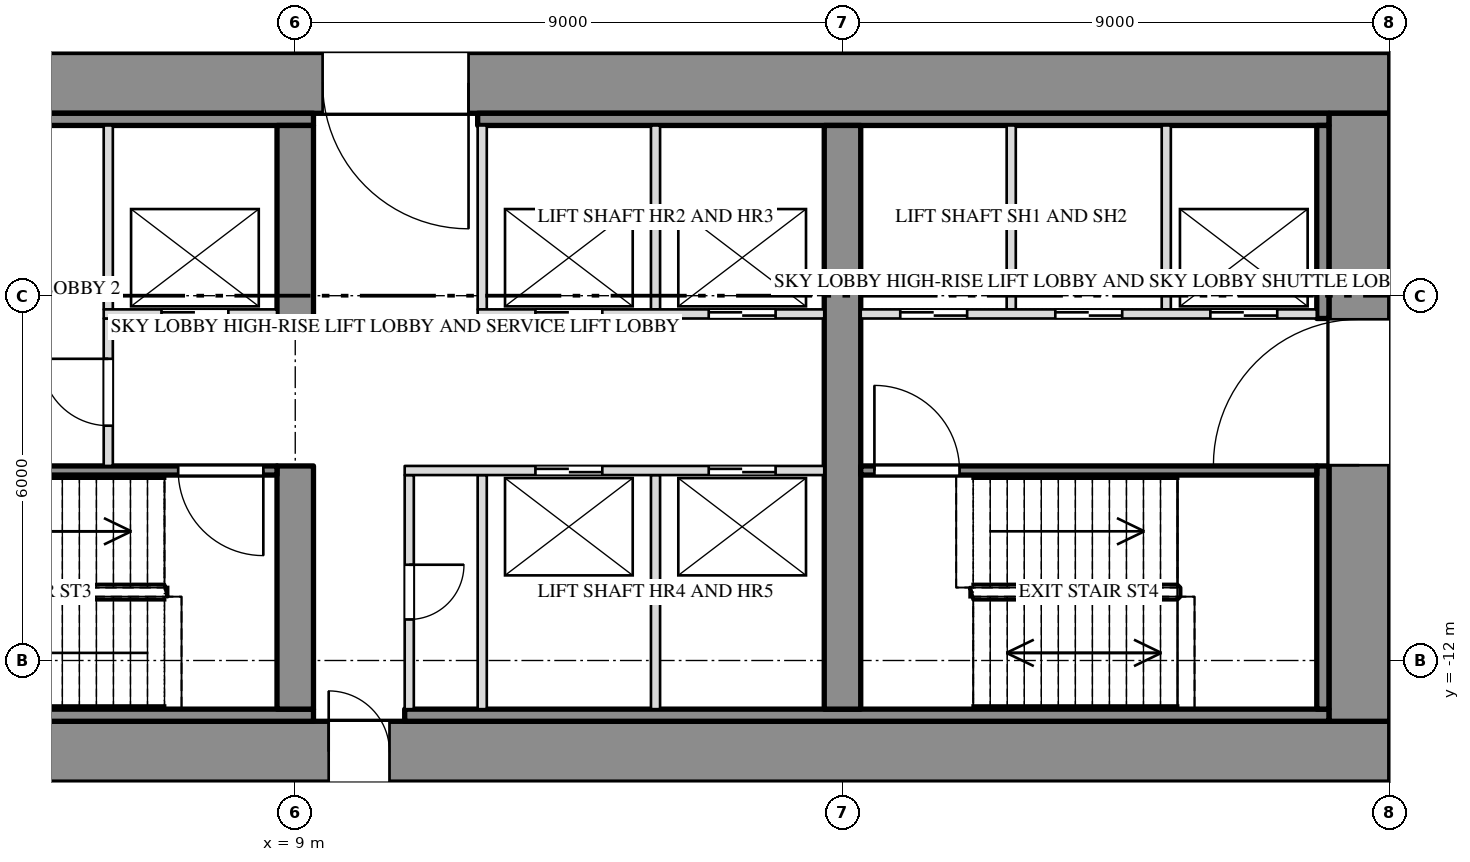
"""IFC4 building model, lengths in metres.
Left out: names, types, materials, properties, quantities, classifications, styles, units other than length and angle.
Written with IfcOpenShell. Run it as: python <this file> out.ifc"""

import sys

from ifc_helpers import new_model, si_unit, direction, frame, frame_2d, origin, place, context, subcontext, project, spatial, rectangle, extrude, element, fill, save


model = new_model("IFC4")
c1 = context("Model", 3, precision=1e-05, world=origin(), true_north=direction((0.0, 1.0)))
c2 = subcontext(c1, "Body", "Model", "MODEL_VIEW")
j1 = project(units=[si_unit("LENGTHUNIT", "METRE"), si_unit("PLANEANGLEUNIT", "RADIAN")], contexts=[c1])
p1 = place(None, origin())
s1 = spatial("IfcSite", under=j1, at=p1, CompositionType="ELEMENT")
p2 = place(p1, origin())
s2 = spatial("IfcBuilding", under=s1, at=p2, CompositionType="ELEMENT")
p3 = place(p2, frame((0.0, 0.0, 156.5)))
s3 = spatial("IfcBuildingStorey", under=s2, at=p3, CompositionType="ELEMENT", Elevation=156.5)
p4 = place(p3, frame((-27.0, -2.5, 0.0), z_axis=(0.0, 0.0, 1.0), x_axis=(1.0, 0.0, 0.0)))
e1 = element("IfcWall", 1, at=p4, inside=s3, PredefinedType="SHEAR", context=c2, shape_type="SweptSolid", body=[
    extrude(rectangle(XDim=54.0, YDim=1.0, at=frame_2d((27.0, 0.0))), origin(), (0.0, 0.0, 1.0), 3.65),
])
p5 = place(p4, frame((15.15, 0.0, 0.0)))
e2 = element("IfcOpeningElement", 2, at=p5, cuts=e1, PredefinedType="OPENING", context=c2, shape_type="SweptSolid", body=[
    extrude(rectangle(XDim=2.4, YDim=2.1, at=frame_2d((1.2, 1.05))), frame((0.0, 0.512, 0.0), z_axis=(0.0, -1.0, 0.0), x_axis=(1.0, 0.0, 0.0)), (0.0, 0.0, 1.0), 1.024),
])
p6 = place(p4, frame((36.45, 0.0, 0.0)))
e3 = element("IfcOpeningElement", 3, at=p6, cuts=e1, PredefinedType="OPENING", context=c2, shape_type="SweptSolid", body=[
    extrude(rectangle(XDim=2.4, YDim=2.1, at=frame_2d((1.2, 1.05))), frame((0.0, 0.512, 0.0), z_axis=(0.0, -1.0, 0.0), x_axis=(1.0, 0.0, 0.0)), (0.0, 0.0, 1.0), 1.024),
])
p7 = place(p3, frame((-27.0, -13.5, 0.0), z_axis=(0.0, 0.0, 1.0), x_axis=(1.0, 0.0, 0.0)))
e4 = element("IfcWall", 4, at=p7, inside=s3, PredefinedType="SHEAR", context=c2, shape_type="SweptSolid", body=[
    extrude(rectangle(XDim=54.0, YDim=1.0, at=frame_2d((27.0, 0.0))), origin(), (0.0, 0.0, 1.0), 3.65),
])
p8 = place(p7, frame((16.45, 0.0, 0.0)))
e5 = element("IfcOpeningElement", 5, at=p8, cuts=e4, PredefinedType="OPENING", context=c2, shape_type="SweptSolid", body=[
    extrude(rectangle(XDim=1.0, YDim=2.1, at=frame_2d((0.5, 1.05))), frame((0.0, 0.512, 0.0), z_axis=(0.0, -1.0, 0.0), x_axis=(1.0, 0.0, 0.0)), (0.0, 0.0, 1.0), 1.024),
])
p9 = place(p7, frame((36.55, 0.0, 0.0)))
e6 = element("IfcOpeningElement", 6, at=p9, cuts=e4, PredefinedType="OPENING", context=c2, shape_type="SweptSolid", body=[
    extrude(rectangle(XDim=1.0, YDim=2.1, at=frame_2d((0.5, 1.05))), frame((0.0, 0.512, 0.0), z_axis=(0.0, -1.0, 0.0), x_axis=(1.0, 0.0, 0.0)), (0.0, 0.0, 1.0), 1.024),
])
p10 = place(p3, frame((26.5, -13.0, 0.0), z_axis=(0.0, 0.0, 1.0), x_axis=(0.0, 1.0, 0.0)))
e7 = element("IfcWall", 7, at=p10, inside=s3, PredefinedType="SHEAR", context=c2, shape_type="SweptSolid", body=[
    extrude(rectangle(XDim=10.0, YDim=1.0, at=frame_2d((5.0, 0.0))), origin(), (0.0, 0.0, 1.0), 3.65),
])
p11 = place(p10, frame((4.212, 0.0, 0.0)))
e8 = element("IfcOpeningElement", 8, at=p11, cuts=e7, PredefinedType="OPENING", context=c2, shape_type="SweptSolid", body=[
    extrude(rectangle(XDim=2.4, YDim=2.1, at=frame_2d((1.2, 1.05))), frame((0.0, 0.512, 0.0), z_axis=(0.0, -1.0, 0.0), x_axis=(1.0, 0.0, 0.0)), (0.0, 0.0, 1.0), 1.024),
])
p12 = place(p3, frame((-9.3, -3.1, 0.0), z_axis=(0.0, 0.0, 1.0), x_axis=(1.0, 0.0, 0.0)))
e9 = element("IfcWall", 9, at=p12, inside=s3, PredefinedType="SHEAR", context=c2, shape_type="SweptSolid", body=[
    extrude(rectangle(XDim=18.6, YDim=0.2, at=frame_2d((9.3, 0.0))), origin(), (0.0, 0.0, 1.0), 3.65),
])
p13 = place(p3, frame((12.0, -3.1, 0.0), z_axis=(0.0, 0.0, 1.0), x_axis=(1.0, 0.0, 0.0)))
e10 = element("IfcWall", 10, at=p13, inside=s3, PredefinedType="SHEAR", context=c2, shape_type="SweptSolid", body=[
    extrude(rectangle(XDim=14.0, YDim=0.2, at=frame_2d((7.0, 0.0))), origin(), (0.0, 0.0, 1.0), 3.65),
])
p14 = place(p3, frame((-9.3, -12.9, 0.0), z_axis=(0.0, 0.0, 1.0), x_axis=(1.0, 0.0, 0.0)))
e11 = element("IfcWall", 11, at=p14, inside=s3, PredefinedType="SHEAR", context=c2, shape_type="SweptSolid", body=[
    extrude(rectangle(XDim=18.6, YDim=0.2, at=frame_2d((9.3, 0.0))), origin(), (0.0, 0.0, 1.0), 3.65),
])
p15 = place(p3, frame((10.8, -12.9, 0.0), z_axis=(0.0, 0.0, 1.0), x_axis=(1.0, 0.0, 0.0)))
e12 = element("IfcWall", 12, at=p15, inside=s3, PredefinedType="SHEAR", context=c2, shape_type="SweptSolid", body=[
    extrude(rectangle(XDim=15.2, YDim=0.2, at=frame_2d((7.6, 0.0))), origin(), (0.0, 0.0, 1.0), 3.65),
])
p16 = place(p3, frame((25.9, -12.8, 0.0), z_axis=(0.0, 0.0, 1.0), x_axis=(0.0, 1.0, 0.0)))
e13 = element("IfcWall", 13, at=p16, inside=s3, PredefinedType="SHEAR", context=c2, shape_type="SweptSolid", body=[
    extrude(rectangle(XDim=4.0, YDim=0.2, at=frame_2d((2.0, 0.0))), origin(), (0.0, 0.0, 1.0), 3.65),
])
p17 = place(p3, frame((25.9, -6.375, 0.0), z_axis=(0.0, 0.0, 1.0), x_axis=(0.0, 1.0, 0.0)))
e14 = element("IfcWall", 14, at=p17, inside=s3, PredefinedType="SHEAR", context=c2, shape_type="SweptSolid", body=[
    extrude(rectangle(XDim=3.175, YDim=0.2, at=frame_2d((1.587, 0.0))), origin(), (0.0, 0.0, 1.0), 3.65),
])
p18 = place(p3, frame((9.0, -12.8, 0.0), z_axis=(0.0, 0.0, 1.0), x_axis=(0.0, 1.0, 0.0)))
e15 = element("IfcWall", 15, at=p18, inside=s3, PredefinedType="SHEAR", context=c2, shape_type="SweptSolid", body=[
    extrude(rectangle(XDim=4.0, YDim=0.6, at=frame_2d((2.0, 0.0))), origin(), (0.0, 0.0, 1.0), 3.65),
])
p19 = place(p3, frame((9.0, -6.375, 0.0), z_axis=(0.0, 0.0, 1.0), x_axis=(0.0, 1.0, 0.0)))
e16 = element("IfcWall", 16, at=p19, inside=s3, PredefinedType="SHEAR", context=c2, shape_type="SweptSolid", body=[
    extrude(rectangle(XDim=3.175, YDim=0.6, at=frame_2d((1.587, 0.0))), origin(), (0.0, 0.0, 1.0), 3.65),
])
p20 = place(p3, frame((18.0, -12.8, 0.0), z_axis=(0.0, 0.0, 1.0), x_axis=(0.0, 1.0, 0.0)))
e17 = element("IfcWall", 17, at=p20, inside=s3, PredefinedType="SHEAR", context=c2, shape_type="SweptSolid", body=[
    extrude(rectangle(XDim=9.6, YDim=0.6, at=frame_2d((4.8, 0.0))), origin(), (0.0, 0.0, 1.0), 3.65),
])
for number, where, z_axis, x_axis in (
    (18, (5.925, -6.225, 0.0), (0.0, 0.0, 1.0), (0.0, 1.0, 0.0)),
    (19, (12.075, -6.225, 0.0), (0.0, 0.0, 1.0), (0.0, 1.0, 0.0)),
    (20, (14.925, -6.225, 0.0), (0.0, 0.0, 1.0), (0.0, 1.0, 0.0)),
    (21, (20.775, -6.225, 0.0), (0.0, 0.0, 1.0), (0.0, 1.0, 0.0)),
    (22, (23.325, -6.225, 0.0), (0.0, 0.0, 1.0), (0.0, 1.0, 0.0)),
):
    element("IfcWall", number, at=place(p3, frame(where, z_axis=z_axis, x_axis=x_axis)), inside=s3, PredefinedType="PARTITIONING", context=c2, shape_type="SweptSolid", body=[
        extrude(rectangle(XDim=3.025, YDim=0.15, at=frame_2d((1.513, 0.0))), origin(), (0.0, 0.0, 1.0), 3.65),
    ])
p21 = place(p3, frame((10.875, -12.8, 0.0), z_axis=(0.0, 0.0, 1.0), x_axis=(0.0, 1.0, 0.0)))
e23 = element("IfcWall", 23, at=p21, inside=s3, PredefinedType="PARTITIONING", context=c2, shape_type="SweptSolid", body=[
    extrude(rectangle(XDim=3.85, YDim=0.15, at=frame_2d((1.925, 0.0))), origin(), (0.0, 0.0, 1.0), 3.65),
])
p22 = place(p21, frame((1.475, 0.0, 0.0)))
e24 = element("IfcOpeningElement", 24, at=p22, cuts=e23, PredefinedType="OPENING", context=c2, shape_type="SweptSolid", body=[
    extrude(rectangle(XDim=0.9, YDim=2.1, at=frame_2d((0.45, 1.05))), frame((0.0, 0.087, 0.0), z_axis=(0.0, -1.0, 0.0), x_axis=(1.0, 0.0, 0.0)), (0.0, 0.0, 1.0), 0.174),
])
for number, where, z_axis, x_axis in (
    (25, (12.075, -12.8, 0.0), (0.0, 0.0, 1.0), (0.0, 1.0, 0.0)),
    (26, (14.925, -12.8, 0.0), (0.0, 0.0, 1.0), (0.0, 1.0, 0.0)),
):
    element("IfcWall", number, at=place(p3, frame(where, z_axis=z_axis, x_axis=x_axis)), inside=s3, PredefinedType="PARTITIONING", context=c2, shape_type="SweptSolid", body=[
        extrude(rectangle(XDim=3.85, YDim=0.15, at=frame_2d((1.925, 0.0))), origin(), (0.0, 0.0, 1.0), 3.65),
    ])
p23 = place(p3, frame((5.925, -8.8, 0.0), z_axis=(0.0, 0.0, 1.0), x_axis=(0.0, 1.0, 0.0)))
e27 = element("IfcWall", 27, at=p23, inside=s3, PredefinedType="PARTITIONING", context=c2, shape_type="SweptSolid", body=[
    extrude(rectangle(XDim=2.425, YDim=0.15, at=frame_2d((1.212, 0.0))), origin(), (0.0, 0.0, 1.0), 3.65),
])
p24 = place(p23, frame((0.662, 0.0, 0.0)))
e28 = element("IfcOpeningElement", 28, at=p24, cuts=e27, PredefinedType="OPENING", context=c2, shape_type="SweptSolid", body=[
    extrude(rectangle(XDim=1.1, YDim=2.1, at=frame_2d((0.55, 1.05))), frame((0.0, 0.087, 0.0), z_axis=(0.0, -1.0, 0.0), x_axis=(1.0, 0.0, 0.0)), (0.0, 0.0, 1.0), 0.174),
])
p25 = place(p3, frame((5.85, -6.3, 0.0), z_axis=(0.0, 0.0, 1.0), x_axis=(1.0, 0.0, 0.0)))
e29 = element("IfcWall", 29, at=p25, inside=s3, PredefinedType="PARTITIONING", context=c2, shape_type="SweptSolid", body=[
    extrude(rectangle(XDim=2.85, YDim=0.15, at=frame_2d((1.425, 0.0))), origin(), (0.0, 0.0, 1.0), 3.65),
])
p26 = place(p25, frame((0.95, 0.0, 0.0)))
e30 = element("IfcOpeningElement", 30, at=p26, cuts=e29, PredefinedType="OPENING", context=c2, shape_type="SweptSolid", body=[
    extrude(rectangle(XDim=1.1, YDim=2.1, at=frame_2d((0.55, 1.05))), frame((0.0, 0.087, 0.0), z_axis=(0.0, -1.0, 0.0), x_axis=(1.0, 0.0, 0.0)), (0.0, 0.0, 1.0), 0.174),
])
p27 = place(p3, frame((12.0, -6.3, 0.0), z_axis=(0.0, 0.0, 1.0), x_axis=(1.0, 0.0, 0.0)))
e31 = element("IfcWall", 31, at=p27, inside=s3, PredefinedType="PARTITIONING", context=c2, shape_type="SweptSolid", body=[
    extrude(rectangle(XDim=5.7, YDim=0.15, at=frame_2d((2.85, 0.0))), origin(), (0.0, 0.0, 1.0), 3.65),
])
p28 = place(p27, frame((0.95, 0.0, 0.0)))
e32 = element("IfcOpeningElement", 32, at=p28, cuts=e31, PredefinedType="OPENING", context=c2, shape_type="SweptSolid", body=[
    extrude(rectangle(XDim=1.1, YDim=2.1, at=frame_2d((0.55, 1.05))), frame((0.0, 0.087, 0.0), z_axis=(0.0, -1.0, 0.0), x_axis=(1.0, 0.0, 0.0)), (0.0, 0.0, 1.0), 0.174),
])
p29 = place(p27, frame((3.8, 0.0, 0.0)))
e33 = element("IfcOpeningElement", 33, at=p29, cuts=e31, PredefinedType="OPENING", context=c2, shape_type="SweptSolid", body=[
    extrude(rectangle(XDim=1.1, YDim=2.1, at=frame_2d((0.55, 1.05))), frame((0.0, 0.087, 0.0), z_axis=(0.0, -1.0, 0.0), x_axis=(1.0, 0.0, 0.0)), (0.0, 0.0, 1.0), 0.174),
])
p30 = place(p3, frame((18.3, -6.3, 0.0), z_axis=(0.0, 0.0, 1.0), x_axis=(1.0, 0.0, 0.0)))
e34 = element("IfcWall", 34, at=p30, inside=s3, PredefinedType="PARTITIONING", context=c2, shape_type="SweptSolid", body=[
    extrude(rectangle(XDim=7.5, YDim=0.15, at=frame_2d((3.75, 0.0))), origin(), (0.0, 0.0, 1.0), 3.65),
])
p31 = place(p30, frame((0.65, 0.0, 0.0)))
e35 = element("IfcOpeningElement", 35, at=p31, cuts=e34, PredefinedType="OPENING", context=c2, shape_type="SweptSolid", body=[
    extrude(rectangle(XDim=1.1, YDim=2.1, at=frame_2d((0.55, 1.05))), frame((0.0, 0.087, 0.0), z_axis=(0.0, -1.0, 0.0), x_axis=(1.0, 0.0, 0.0)), (0.0, 0.0, 1.0), 0.174),
])
p32 = place(p30, frame((3.2, 0.0, 0.0)))
e36 = element("IfcOpeningElement", 36, at=p32, cuts=e34, PredefinedType="OPENING", context=c2, shape_type="SweptSolid", body=[
    extrude(rectangle(XDim=1.1, YDim=2.1, at=frame_2d((0.55, 1.05))), frame((0.0, 0.087, 0.0), z_axis=(0.0, -1.0, 0.0), x_axis=(1.0, 0.0, 0.0)), (0.0, 0.0, 1.0), 0.174),
])
p33 = place(p30, frame((5.75, 0.0, 0.0)))
e37 = element("IfcOpeningElement", 37, at=p33, cuts=e34, PredefinedType="OPENING", context=c2, shape_type="SweptSolid", body=[
    extrude(rectangle(XDim=1.1, YDim=2.1, at=frame_2d((0.55, 1.05))), frame((0.0, 0.087, 0.0), z_axis=(0.0, -1.0, 0.0), x_axis=(1.0, 0.0, 0.0)), (0.0, 0.0, 1.0), 0.174),
])
p34 = place(p3, frame((0.3, -8.875, 0.0), z_axis=(0.0, 0.0, 1.0), x_axis=(1.0, 0.0, 0.0)))
e38 = element("IfcWall", 38, at=p34, inside=s3, PredefinedType="SHEAR", context=c2, shape_type="SweptSolid", body=[
    extrude(rectangle(XDim=8.4, YDim=0.15, at=frame_2d((4.2, 0.0))), origin(), (0.0, 0.0, 1.0), 3.65),
])
p35 = place(p34, frame((6.775, 0.0, 0.0)))
e39 = element("IfcOpeningElement", 39, at=p35, cuts=e38, PredefinedType="OPENING", context=c2, shape_type="SweptSolid", body=[
    extrude(rectangle(XDim=1.4, YDim=2.1, at=frame_2d((0.7, 1.05))), frame((0.0, 0.087, 0.0), z_axis=(0.0, -1.0, 0.0), x_axis=(1.0, 0.0, 0.0)), (0.0, 0.0, 1.0), 0.174),
])
p36 = place(p3, frame((10.8, -8.875, 0.0), z_axis=(0.0, 0.0, 1.0), x_axis=(1.0, 0.0, 0.0)))
e40 = element("IfcWall", 40, at=p36, inside=s3, PredefinedType="PARTITIONING", context=c2, shape_type="SweptSolid", body=[
    extrude(rectangle(XDim=6.9, YDim=0.15, at=frame_2d((3.45, 0.0))), origin(), (0.0, 0.0, 1.0), 3.65),
])
p37 = place(p36, frame((2.15, 0.0, 0.0)))
e41 = element("IfcOpeningElement", 41, at=p37, cuts=e40, PredefinedType="OPENING", context=c2, shape_type="SweptSolid", body=[
    extrude(rectangle(XDim=1.1, YDim=2.1, at=frame_2d((0.55, 1.05))), frame((0.0, 0.087, 0.0), z_axis=(0.0, -1.0, 0.0), x_axis=(1.0, 0.0, 0.0)), (0.0, 0.0, 1.0), 0.174),
])
p38 = place(p36, frame((5.0, 0.0, 0.0)))
e42 = element("IfcOpeningElement", 42, at=p38, cuts=e40, PredefinedType="OPENING", context=c2, shape_type="SweptSolid", body=[
    extrude(rectangle(XDim=1.1, YDim=2.1, at=frame_2d((0.55, 1.05))), frame((0.0, 0.087, 0.0), z_axis=(0.0, -1.0, 0.0), x_axis=(1.0, 0.0, 0.0)), (0.0, 0.0, 1.0), 0.174),
])
p39 = place(p3, frame((18.3, -8.875, 0.0), z_axis=(0.0, 0.0, 1.0), x_axis=(1.0, 0.0, 0.0)))
e43 = element("IfcWall", 43, at=p39, inside=s3, PredefinedType="SHEAR", context=c2, shape_type="SweptSolid", body=[
    extrude(rectangle(XDim=7.5, YDim=0.15, at=frame_2d((3.75, 0.0))), origin(), (0.0, 0.0, 1.0), 3.65),
])
p40 = place(p39, frame((0.225, 0.0, 0.0)))
e44 = element("IfcOpeningElement", 44, at=p40, cuts=e43, PredefinedType="OPENING", context=c2, shape_type="SweptSolid", body=[
    extrude(rectangle(XDim=1.4, YDim=2.1, at=frame_2d((0.7, 1.05))), frame((0.0, 0.087, 0.0), z_axis=(0.0, -1.0, 0.0), x_axis=(1.0, 0.0, 0.0)), (0.0, 0.0, 1.0), 0.174),
])
p41 = place(p24, origin())
e45 = element("IfcDoor", 45, at=p41, inside=s3, OperationType="SINGLE_SWING_RIGHT", PredefinedType="DOOR", context=c2, shape_type="SweptSolid", body=[
    extrude(rectangle(XDim=1.1, YDim=2.1, at=frame_2d((0.55, 1.05))), frame((0.0, 0.025, 0.0), z_axis=(0.0, -1.0, 0.0), x_axis=(1.0, 0.0, 0.0)), (0.0, 0.0, 1.0), 0.05),
])
fill(e28, e45)
p42 = place(p26, origin())
e46 = element("IfcDoor", 46, at=p42, inside=s3, OperationType="SLIDING_TO_LEFT", PredefinedType="DOOR", context=c2, shape_type="SweptSolid", body=[
    extrude(rectangle(XDim=1.1, YDim=2.1, at=frame_2d((0.55, 1.05))), frame((0.0, 0.025, 0.0), z_axis=(0.0, -1.0, 0.0), x_axis=(1.0, 0.0, 0.0)), (0.0, 0.0, 1.0), 0.05),
])
fill(e30, e46)
p43 = place(p35, origin())
e47 = element("IfcDoor", 47, at=p43, inside=s3, OperationType="DOUBLE_DOOR_SINGLE_SWING", PredefinedType="DOOR", context=c2, shape_type="SweptSolid", body=[
    extrude(rectangle(XDim=1.4, YDim=2.1, at=frame_2d((0.7, 1.05))), frame((0.0, 0.025, 0.0), z_axis=(0.0, -1.0, 0.0), x_axis=(1.0, 0.0, 0.0)), (0.0, 0.0, 1.0), 0.05),
])
fill(e39, e47)
p44 = place(p9, origin())
e48 = element("IfcDoor", 48, at=p44, inside=s3, OperationType="SINGLE_SWING_LEFT", PredefinedType="DOOR", context=c2, shape_type="SweptSolid", body=[
    extrude(rectangle(XDim=1.0, YDim=2.1, at=frame_2d((0.5, 1.05))), frame((0.0, 0.025, 0.0), z_axis=(0.0, -1.0, 0.0), x_axis=(1.0, 0.0, 0.0)), (0.0, 0.0, 1.0), 0.05),
])
fill(e6, e48)
p45 = place(p6, origin())
e49 = element("IfcDoor", 49, at=p45, inside=s3, OperationType="DOUBLE_DOOR_SINGLE_SWING", PredefinedType="DOOR", context=c2, shape_type="SweptSolid", body=[
    extrude(rectangle(XDim=2.4, YDim=2.1, at=frame_2d((1.2, 1.05))), frame((0.0, 0.025, 0.0), z_axis=(0.0, -1.0, 0.0), x_axis=(1.0, 0.0, 0.0)), (0.0, 0.0, 1.0), 0.05),
])
fill(e3, e49)
p46 = place(p22, origin())
e50 = element("IfcDoor", 50, at=p46, inside=s3, OperationType="SINGLE_SWING_LEFT", PredefinedType="DOOR", context=c2, shape_type="SweptSolid", body=[
    extrude(rectangle(XDim=0.9, YDim=2.1, at=frame_2d((0.45, 1.05))), frame((0.0, 0.025, 0.0), z_axis=(0.0, -1.0, 0.0), x_axis=(1.0, 0.0, 0.0)), (0.0, 0.0, 1.0), 0.05),
])
fill(e24, e50)
p47 = place(p37, origin())
e51 = element("IfcDoor", 51, at=p47, inside=s3, OperationType="SLIDING_TO_RIGHT", PredefinedType="DOOR", context=c2, shape_type="SweptSolid", body=[
    extrude(rectangle(XDim=1.1, YDim=2.1, at=frame_2d((0.55, 1.05))), frame((0.0, 0.025, 0.0), z_axis=(0.0, -1.0, 0.0), x_axis=(1.0, 0.0, 0.0)), (0.0, 0.0, 1.0), 0.05),
])
fill(e41, e51)
p48 = place(p28, origin())
e52 = element("IfcDoor", 52, at=p48, inside=s3, OperationType="SLIDING_TO_LEFT", PredefinedType="DOOR", context=c2, shape_type="SweptSolid", body=[
    extrude(rectangle(XDim=1.1, YDim=2.1, at=frame_2d((0.55, 1.05))), frame((0.0, 0.025, 0.0), z_axis=(0.0, -1.0, 0.0), x_axis=(1.0, 0.0, 0.0)), (0.0, 0.0, 1.0), 0.05),
])
fill(e32, e52)
p49 = place(p38, origin())
e53 = element("IfcDoor", 53, at=p49, inside=s3, OperationType="SLIDING_TO_RIGHT", PredefinedType="DOOR", context=c2, shape_type="SweptSolid", body=[
    extrude(rectangle(XDim=1.1, YDim=2.1, at=frame_2d((0.55, 1.05))), frame((0.0, 0.025, 0.0), z_axis=(0.0, -1.0, 0.0), x_axis=(1.0, 0.0, 0.0)), (0.0, 0.0, 1.0), 0.05),
])
fill(e42, e53)
p50 = place(p29, origin())
e54 = element("IfcDoor", 54, at=p50, inside=s3, OperationType="SLIDING_TO_LEFT", PredefinedType="DOOR", context=c2, shape_type="SweptSolid", body=[
    extrude(rectangle(XDim=1.1, YDim=2.1, at=frame_2d((0.55, 1.05))), frame((0.0, 0.025, 0.0), z_axis=(0.0, -1.0, 0.0), x_axis=(1.0, 0.0, 0.0)), (0.0, 0.0, 1.0), 0.05),
])
fill(e33, e54)
p51 = place(p40, origin())
e55 = element("IfcDoor", 55, at=p51, inside=s3, OperationType="DOUBLE_DOOR_SINGLE_SWING", PredefinedType="DOOR", context=c2, shape_type="SweptSolid", body=[
    extrude(rectangle(XDim=1.4, YDim=2.1, at=frame_2d((0.7, 1.05))), frame((0.0, 0.025, 0.0), z_axis=(0.0, -1.0, 0.0), x_axis=(1.0, 0.0, 0.0)), (0.0, 0.0, 1.0), 0.05),
])
fill(e44, e55)
p52 = place(p31, origin())
e56 = element("IfcDoor", 56, at=p52, inside=s3, OperationType="SLIDING_TO_LEFT", PredefinedType="DOOR", context=c2, shape_type="SweptSolid", body=[
    extrude(rectangle(XDim=1.1, YDim=2.1, at=frame_2d((0.55, 1.05))), frame((0.0, 0.025, 0.0), z_axis=(0.0, -1.0, 0.0), x_axis=(1.0, 0.0, 0.0)), (0.0, 0.0, 1.0), 0.05),
])
fill(e35, e56)
p53 = place(p32, origin())
e57 = element("IfcDoor", 57, at=p53, inside=s3, OperationType="SLIDING_TO_RIGHT", PredefinedType="DOOR", context=c2, shape_type="SweptSolid", body=[
    extrude(rectangle(XDim=1.1, YDim=2.1, at=frame_2d((0.55, 1.05))), frame((0.0, 0.025, 0.0), z_axis=(0.0, -1.0, 0.0), x_axis=(1.0, 0.0, 0.0)), (0.0, 0.0, 1.0), 0.05),
])
fill(e36, e57)
p54 = place(p33, origin())
e58 = element("IfcDoor", 58, at=p54, inside=s3, OperationType="SLIDING_TO_LEFT", PredefinedType="DOOR", context=c2, shape_type="SweptSolid", body=[
    extrude(rectangle(XDim=1.1, YDim=2.1, at=frame_2d((0.55, 1.05))), frame((0.0, 0.025, 0.0), z_axis=(0.0, -1.0, 0.0), x_axis=(1.0, 0.0, 0.0)), (0.0, 0.0, 1.0), 0.05),
])
fill(e37, e58)
p55 = place(p11, origin())
e59 = element("IfcDoor", 59, at=p55, inside=s3, OperationType="DOUBLE_DOOR_SINGLE_SWING", PredefinedType="DOOR", context=c2, shape_type="SweptSolid", body=[
    extrude(rectangle(XDim=2.4, YDim=2.1, at=frame_2d((1.2, 1.05))), frame((0.0, 0.025, 0.0), z_axis=(0.0, -1.0, 0.0), x_axis=(1.0, 0.0, 0.0)), (0.0, 0.0, 1.0), 0.05),
])
fill(e8, e59)
save(model, sys.argv[1])
